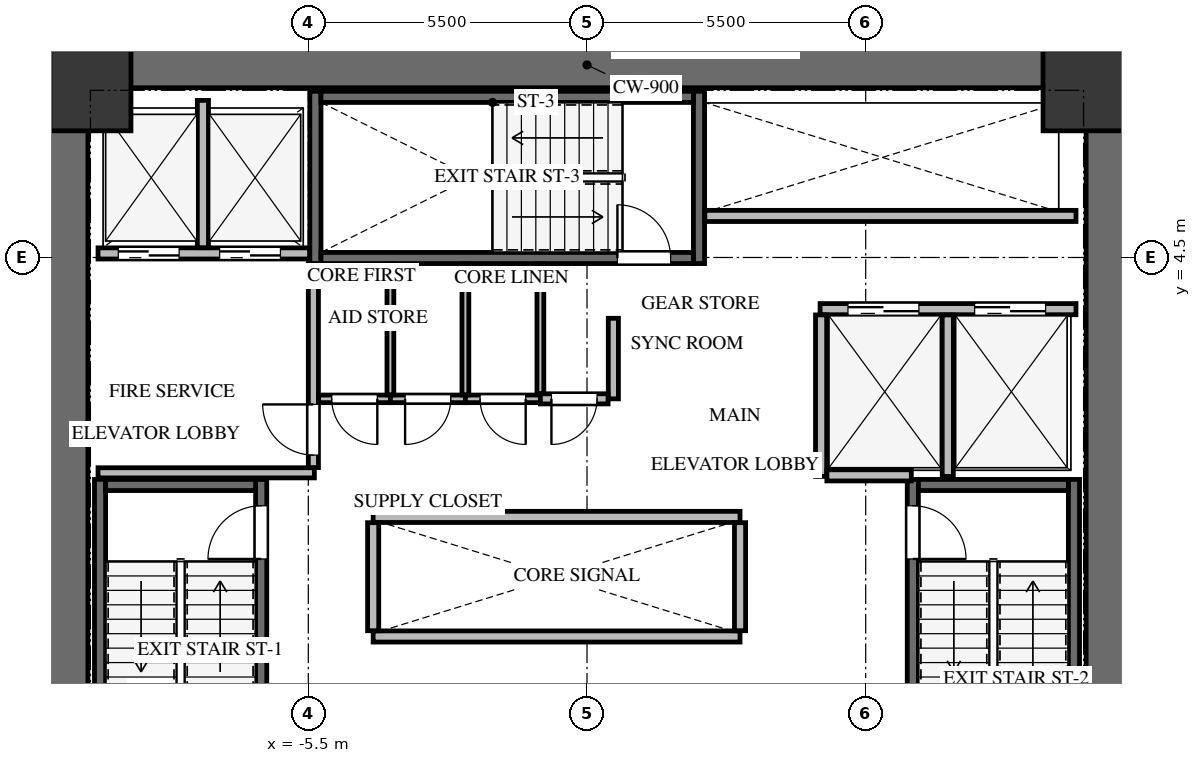
"""IFC4 building model, lengths in metres.
Left out: names, types, materials, properties, quantities, classifications, styles, units other than length and angle.
Written with IfcOpenShell. Run it as: python <this file> out.ifc"""

import sys

from ifc_helpers import new_model, si_unit, direction, frame, frame_2d, origin, origin_2d, place, context, subcontext, project, spatial, rectangle, extrude, source, transform, mapped, element, fill, save


model = new_model("IFC4")
c1 = context("Model", 3, precision=1e-05, world=origin(), true_north=direction((0.0, 1.0)))
c2 = subcontext(c1, "Body", "Model", "MODEL_VIEW")
j1 = project(units=[si_unit("LENGTHUNIT", "METRE"), si_unit("PLANEANGLEUNIT", "RADIAN")], contexts=[c1])
p1 = place(None, origin())
s1 = spatial("IfcSite", under=j1, at=p1, CompositionType="ELEMENT")
p2 = place(p1, origin())
s2 = spatial("IfcBuilding", under=s1, at=p2, CompositionType="ELEMENT")
p3 = place(p2, frame((0.0, 0.0, 55.5)))
s3 = spatial("IfcBuildingStorey", under=s2, at=p3, CompositionType="ELEMENT", Elevation=55.5)
for number, where, z_axis, x_axis in (
    (1, (-10.3, -8.75, 0.0), (0.0, 0.0, 1.0), (0.0, 1.0, 0.0)),
    (2, (10.3, -8.75, 0.0), (0.0, 0.0, 1.0), (0.0, 1.0, 0.0)),
):
    element("IfcWall", number, at=place(p3, frame(where, z_axis=z_axis, x_axis=x_axis)), inside=s3, PredefinedType="SHEAR", context=c2, shape_type="SweptSolid", body=[
        extrude(rectangle(XDim=17.5, YDim=0.9, at=frame_2d((8.75, 0.0))), origin(), (0.0, 0.0, 1.0), 3.3),
    ])
p4 = place(p3, frame((-9.85, 8.3, 0.0), z_axis=(0.0, 0.0, 1.0), x_axis=(1.0, 0.0, 0.0)))
e3 = element("IfcWall", 3, at=p4, inside=s3, PredefinedType="SHEAR", context=c2, shape_type="SweptSolid", body=[
    extrude(rectangle(XDim=19.7, YDim=0.9, at=frame_2d((9.85, 0.0))), origin(), (0.0, 0.0, 1.0), 3.3),
])
p5 = place(p3, frame((-6.43, -7.77, -0.24), z_axis=(0.0, 0.0, 1.0), x_axis=(0.0, 1.0, 0.0)))
e4 = element("IfcWall", 4, at=p5, inside=s3, PredefinedType="SHEAR", context=c2, shape_type="SweptSolid", body=[
    extrude(rectangle(XDim=7.89, YDim=0.22, at=frame_2d((3.945, 0.0))), origin(), (0.0, 0.0, 1.0), 3.3),
])
p6 = place(p5, frame((6.32, 0.0, 0.0)))
e5 = element("IfcOpeningElement", 5, at=p6, cuts=e4, PredefinedType="OPENING", context=c2, shape_type="SweptSolid", body=[
    extrude(rectangle(XDim=1.05, YDim=2.15, at=frame_2d((0.525, 1.075))), frame((0.0, 0.12, 0.0), z_axis=(0.0, -1.0, 0.0), x_axis=(1.0, 0.0, 0.0)), (0.0, 0.0, 1.0), 0.24),
])
p7 = place(p3, frame((-9.61, 0.12, -0.24), z_axis=(0.0, 0.0, 1.0), x_axis=(0.0, -1.0, 0.0)))
e6 = element("IfcWall", 6, at=p7, inside=s3, PredefinedType="SHEAR", context=c2, shape_type="SweptSolid", body=[
    extrude(rectangle(XDim=7.89, YDim=0.22, at=frame_2d((3.945, 0.0))), origin(), (0.0, 0.0, 1.0), 3.3),
])
p8 = place(p3, frame((-6.54, 0.01, -0.24), z_axis=(0.0, 0.0, 1.0), x_axis=(-1.0, 0.0, 0.0)))
e7 = element("IfcWall", 7, at=p8, inside=s3, PredefinedType="SHEAR", context=c2, shape_type="SweptSolid", body=[
    extrude(rectangle(XDim=2.96, YDim=0.22, at=frame_2d((1.48, 0.0))), origin(), (0.0, 0.0, 1.0), 3.3),
])
p9 = place(p3, frame((9.61, -7.77, -0.24), z_axis=(0.0, 0.0, 1.0), x_axis=(0.0, 1.0, 0.0)))
e8 = element("IfcWall", 8, at=p9, inside=s3, PredefinedType="SHEAR", context=c2, shape_type="SweptSolid", body=[
    extrude(rectangle(XDim=7.89, YDim=0.22, at=frame_2d((3.945, 0.0))), origin(), (0.0, 0.0, 1.0), 3.3),
])
p10 = place(p3, frame((6.43, 0.12, -0.24), z_axis=(0.0, 0.0, 1.0), x_axis=(0.0, -1.0, 0.0)))
e9 = element("IfcWall", 9, at=p10, inside=s3, PredefinedType="SHEAR", context=c2, shape_type="SweptSolid", body=[
    extrude(rectangle(XDim=7.89, YDim=0.22, at=frame_2d((3.945, 0.0))), origin(), (0.0, 0.0, 1.0), 3.3),
])
p11 = place(p10, frame((0.52, 0.0, 0.0)))
e10 = element("IfcOpeningElement", 10, at=p11, cuts=e9, PredefinedType="OPENING", context=c2, shape_type="SweptSolid", body=[
    extrude(rectangle(XDim=1.05, YDim=2.15, at=frame_2d((0.525, 1.075))), frame((0.0, 0.12, 0.0), z_axis=(0.0, -1.0, 0.0), x_axis=(1.0, 0.0, 0.0)), (0.0, 0.0, 1.0), 0.24),
])
p12 = place(p3, frame((9.5, 0.01, -0.24), z_axis=(0.0, 0.0, 1.0), x_axis=(-1.0, 0.0, 0.0)))
e11 = element("IfcWall", 11, at=p12, inside=s3, PredefinedType="SHEAR", context=c2, shape_type="SweptSolid", body=[
    extrude(rectangle(XDim=2.96, YDim=0.22, at=frame_2d((1.48, 0.0))), origin(), (0.0, 0.0, 1.0), 3.3),
])
for number, where, z_axis, x_axis in (
    (12, (2.21, 4.38, -0.24), (0.0, 0.0, 1.0), (0.0, 1.0, 0.0)),
    (13, (-5.36, 7.78, -0.24), (0.0, 0.0, 1.0), (0.0, -1.0, 0.0)),
):
    element("IfcWall", number, at=place(p3, frame(where, z_axis=z_axis, x_axis=x_axis)), inside=s3, PredefinedType="SHEAR", context=c2, shape_type="SweptSolid", body=[
        extrude(rectangle(XDim=3.4, YDim=0.22, at=frame_2d((1.7, 0.0))), origin(), (0.0, 0.0, 1.0), 3.3),
    ])
p13 = place(p3, frame((-5.25, 4.49, -0.24), z_axis=(0.0, 0.0, 1.0), x_axis=(1.0, 0.0, 0.0)))
e14 = element("IfcWall", 14, at=p13, inside=s3, PredefinedType="SHEAR", context=c2, shape_type="SweptSolid", body=[
    extrude(rectangle(XDim=7.35, YDim=0.22, at=frame_2d((3.675, 0.0))), origin(), (0.0, 0.0, 1.0), 3.3),
])
p14 = place(p13, frame((5.85, 0.0, 0.0)))
e15 = element("IfcOpeningElement", 15, at=p14, cuts=e14, PredefinedType="OPENING", context=c2, shape_type="SweptSolid", body=[
    extrude(rectangle(XDim=1.05, YDim=2.15, at=frame_2d((0.525, 1.075))), frame((0.0, 0.12, 0.0), z_axis=(0.0, -1.0, 0.0), x_axis=(1.0, 0.0, 0.0)), (0.0, 0.0, 1.0), 0.24),
])
p15 = place(p3, frame((2.1, 7.67, -0.24), z_axis=(0.0, 0.0, 1.0), x_axis=(-1.0, 0.0, 0.0)))
e16 = element("IfcWall", 16, at=p15, inside=s3, PredefinedType="SHEAR", context=c2, shape_type="SweptSolid", body=[
    extrude(rectangle(XDim=7.35, YDim=0.22, at=frame_2d((3.675, 0.0))), origin(), (0.0, 0.0, 1.0), 3.3),
])
m1 = source(origin(), c2, "Body", "SweptSolid", [
    extrude(rectangle(XDim=1.6, YDim=1.6, at=origin_2d()), origin(), (0.0, 0.0, 1.0), 3.3),
])
for number, where, z_axis, x_axis in (
    (17, (9.8, 7.8, -0.24), (0.0, 0.0, 1.0), (1.0, 0.0, 0.0)),
    (18, (-9.8, 7.8, -0.24), (0.0, 0.0, 1.0), (1.0, 0.0, 0.0)),
):
    element("IfcColumn", number, at=place(p3, frame(where, z_axis=z_axis, x_axis=x_axis)), inside=s3, PredefinedType="COLUMN", context=c2, shape_type="MappedRepresentation", body=[
        mapped(m1, transform((0.0, 0.0, 0.0), x_axis=(1.0, 0.0, 0.0), y_axis=(0.0, 1.0, 0.0), z_axis=(0.0, 0.0, 1.0), scale=1.0)),
    ])
p16 = place(p3, frame((-9.65, 4.58, 0.0), z_axis=(0.0, 0.0, 1.0), x_axis=(1.0, 0.0, 0.0)))
e19 = element("IfcWall", 19, at=p16, inside=s3, PredefinedType="SOLIDWALL", context=c2, shape_type="SweptSolid", body=[
    extrude(rectangle(XDim=4.175, YDim=0.22, at=frame_2d((2.087, 0.0))), origin(), (0.0, 0.0, 1.0), 3.045),
])
p17 = place(p16, frame((0.4, 0.0, 0.0)))
e20 = element("IfcOpeningElement", 20, at=p17, cuts=e19, PredefinedType="OPENING", context=c2, shape_type="SweptSolid", body=[
    extrude(rectangle(XDim=1.2, YDim=2.15, at=frame_2d((0.6, 1.075))), frame((0.0, 0.12, 0.0), z_axis=(0.0, -1.0, 0.0), x_axis=(1.0, 0.0, 0.0)), (0.0, 0.0, 1.0), 0.24),
])
p18 = place(p16, frame((2.4, 0.0, 0.0)))
e21 = element("IfcOpeningElement", 21, at=p18, cuts=e19, PredefinedType="OPENING", context=c2, shape_type="SweptSolid", body=[
    extrude(rectangle(XDim=1.2, YDim=2.15, at=frame_2d((0.6, 1.075))), frame((0.0, 0.12, 0.0), z_axis=(0.0, -1.0, 0.0), x_axis=(1.0, 0.0, 0.0)), (0.0, 0.0, 1.0), 0.24),
])
p19 = place(p3, frame((-7.58, 4.694, 0.0), z_axis=(0.0, 0.0, 1.0), x_axis=(0.0, 1.0, 0.0)))
e22 = element("IfcWall", 22, at=p19, inside=s3, PredefinedType="SOLIDWALL", context=c2, shape_type="SweptSolid", body=[
    extrude(rectangle(XDim=2.906, YDim=0.22, at=frame_2d((1.453, 0.0))), origin(), (0.0, 0.0, 1.0), 3.045),
])
p20 = place(p3, frame((-9.65, 0.25, 0.0), z_axis=(0.0, 0.0, 1.0), x_axis=(1.0, 0.0, 0.0)))
e23 = element("IfcWall", 23, at=p20, inside=s3, PredefinedType="SOLIDWALL", context=c2, shape_type="SweptSolid", body=[
    extrude(rectangle(XDim=4.27, YDim=0.2, at=frame_2d((2.135, 0.0))), origin(), (0.0, 0.0, 1.0), 3.045),
])
p21 = place(p3, frame((-5.4, 0.354, 0.0), z_axis=(0.0, 0.0, 1.0), x_axis=(0.0, 1.0, 0.0)))
e24 = element("IfcWall", 24, at=p21, inside=s3, PredefinedType="SOLIDWALL", context=c2, shape_type="SweptSolid", body=[
    extrude(rectangle(XDim=4.026, YDim=0.2, at=frame_2d((2.013, 0.0))), origin(), (0.0, 0.0, 1.0), 3.045),
])
p22 = place(p21, frame((0.246, 0.0, 0.0)))
e25 = element("IfcOpeningElement", 25, at=p22, cuts=e24, PredefinedType="OPENING", context=c2, shape_type="SweptSolid", body=[
    extrude(rectangle(XDim=1.0, YDim=2.15, at=frame_2d((0.5, 1.075))), frame((0.0, 0.11, 0.0), z_axis=(0.0, -1.0, 0.0), x_axis=(1.0, 0.0, 0.0)), (0.0, 0.0, 1.0), 0.22),
])
p23 = place(p3, frame((4.6, 3.48, 0.0), z_axis=(0.0, 0.0, 1.0), x_axis=(1.0, 0.0, 0.0)))
e26 = element("IfcWall", 26, at=p23, inside=s3, PredefinedType="SOLIDWALL", context=c2, shape_type="SweptSolid", body=[
    extrude(rectangle(XDim=5.05, YDim=0.22, at=frame_2d((2.525, 0.0))), origin(), (0.0, 0.0, 1.0), 3.045),
])
p24 = place(p23, frame((0.55, 0.0, 0.0)))
e27 = element("IfcOpeningElement", 27, at=p24, cuts=e26, PredefinedType="OPENING", context=c2, shape_type="SweptSolid", body=[
    extrude(rectangle(XDim=1.4, YDim=2.15, at=frame_2d((0.7, 1.075))), frame((0.0, 0.12, 0.0), z_axis=(0.0, -1.0, 0.0), x_axis=(1.0, 0.0, 0.0)), (0.0, 0.0, 1.0), 0.24),
])
p25 = place(p23, frame((3.05, 0.0, 0.0)))
e28 = element("IfcOpeningElement", 28, at=p25, cuts=e26, PredefinedType="OPENING", context=c2, shape_type="SweptSolid", body=[
    extrude(rectangle(XDim=1.4, YDim=2.15, at=frame_2d((0.7, 1.075))), frame((0.0, 0.12, 0.0), z_axis=(0.0, -1.0, 0.0), x_axis=(1.0, 0.0, 0.0)), (0.0, 0.0, 1.0), 0.24),
])
for number, where, z_axis, x_axis in (
    (29, (4.62, 0.18, 0.0), (0.0, 0.0, 1.0), (0.0, 1.0, 0.0)),
    (30, (7.12, 0.18, 0.0), (0.0, 0.0, 1.0), (0.0, 1.0, 0.0)),
):
    element("IfcWall", number, at=place(p3, frame(where, z_axis=z_axis, x_axis=x_axis)), inside=s3, PredefinedType="SOLIDWALL", context=c2, shape_type="SweptSolid", body=[
        extrude(rectangle(XDim=3.186, YDim=0.22, at=frame_2d((1.593, 0.0))), origin(), (0.0, 0.0, 1.0), 3.045),
    ])
p26 = place(p3, frame((4.734, 0.2, 0.0), z_axis=(0.0, 0.0, 1.0), x_axis=(1.0, 0.0, 0.0)))
e31 = element("IfcWall", 31, at=p26, inside=s3, PredefinedType="SOLIDWALL", context=c2, shape_type="SweptSolid", body=[
    extrude(rectangle(XDim=1.666, YDim=0.22, at=frame_2d((0.833, 0.0))), origin(), (0.0, 0.0, 1.0), 3.045),
])
for number, where, z_axis, x_axis in (
    (32, (-4.22, -2.98, 0.0), (0.0, 0.0, 1.0), (1.0, 0.0, 0.0)),
    (33, (-4.22, -0.62, 0.0), (0.0, 0.0, 1.0), (1.0, 0.0, 0.0)),
):
    element("IfcWall", number, at=place(p3, frame(where, z_axis=z_axis, x_axis=x_axis)), inside=s3, PredefinedType="SOLIDWALL", context=c2, shape_type="SweptSolid", body=[
        extrude(rectangle(XDim=7.24, YDim=0.22, at=frame_2d((3.62, 0.0))), origin(), (0.0, 0.0, 1.0), 3.045),
    ])
for number, where, z_axis, x_axis in (
    (34, (-4.22, -2.866, 0.0), (0.0, 0.0, 1.0), (0.0, 1.0, 0.0)),
    (35, (3.02, -2.866, 0.0), (0.0, 0.0, 1.0), (0.0, 1.0, 0.0)),
):
    element("IfcWall", number, at=place(p3, frame(where, z_axis=z_axis, x_axis=x_axis)), inside=s3, PredefinedType="SOLIDWALL", context=c2, shape_type="SweptSolid", body=[
        extrude(rectangle(XDim=2.132, YDim=0.22, at=frame_2d((1.066, 0.0))), origin(), (0.0, 0.0, 1.0), 3.045),
    ])
p27 = place(p3, frame((2.325, 5.32, 0.0), z_axis=(0.0, 0.0, 1.0), x_axis=(1.0, 0.0, 0.0)))
e36 = element("IfcWall", 36, at=p27, inside=s3, PredefinedType="SOLIDWALL", context=c2, shape_type="SweptSolid", body=[
    extrude(rectangle(XDim=7.325, YDim=0.22, at=frame_2d((3.663, 0.0))), origin(), (0.0, 0.0, 1.0), 3.045),
])
p28 = place(p3, frame((-3.88, 1.71, 0.0), z_axis=(0.0, 0.0, 1.0), x_axis=(-1.0, 0.0, 0.0)))
e37 = element("IfcWall", 37, at=p28, inside=s3, PredefinedType="PARTITIONING", context=c2, shape_type="SweptSolid", body=[
    extrude(rectangle(XDim=1.416, YDim=0.15, at=frame_2d((0.708, 0.0))), origin(), (0.0, 0.0, 1.0), 3.045),
])
p29 = place(p28, frame((0.258, 0.0, 0.0)))
e38 = element("IfcOpeningElement", 38, at=p29, cuts=e37, PredefinedType="OPENING", context=c2, shape_type="SweptSolid", body=[
    extrude(rectangle(XDim=0.9, YDim=2.05, at=frame_2d((0.45, 1.025))), frame((0.0, 0.085, 0.0), z_axis=(0.0, -1.0, 0.0), x_axis=(1.0, 0.0, 0.0)), (0.0, 0.0, 1.0), 0.17),
])
p30 = place(p3, frame((-2.4, 1.71, 0.0), z_axis=(0.0, 0.0, 1.0), x_axis=(-1.0, 0.0, 0.0)))
e39 = element("IfcWall", 39, at=p30, inside=s3, PredefinedType="PARTITIONING", context=c2, shape_type="SweptSolid", body=[
    extrude(rectangle(XDim=1.48, YDim=0.15, at=frame_2d((0.74, 0.0))), origin(), (0.0, 0.0, 1.0), 3.045),
])
p31 = place(p30, frame((0.29, 0.0, 0.0)))
e40 = element("IfcOpeningElement", 40, at=p31, cuts=e39, PredefinedType="OPENING", context=c2, shape_type="SweptSolid", body=[
    extrude(rectangle(XDim=0.9, YDim=2.05, at=frame_2d((0.45, 1.025))), frame((0.0, 0.085, 0.0), z_axis=(0.0, -1.0, 0.0), x_axis=(1.0, 0.0, 0.0)), (0.0, 0.0, 1.0), 0.17),
])
p32 = place(p3, frame((-0.92, 1.71, 0.0), z_axis=(0.0, 0.0, 1.0), x_axis=(-1.0, 0.0, 0.0)))
e41 = element("IfcWall", 41, at=p32, inside=s3, PredefinedType="PARTITIONING", context=c2, shape_type="SweptSolid", body=[
    extrude(rectangle(XDim=1.48, YDim=0.15, at=frame_2d((0.74, 0.0))), origin(), (0.0, 0.0, 1.0), 3.045),
])
p33 = place(p32, frame((0.29, 0.0, 0.0)))
e42 = element("IfcOpeningElement", 42, at=p33, cuts=e41, PredefinedType="OPENING", context=c2, shape_type="SweptSolid", body=[
    extrude(rectangle(XDim=0.9, YDim=2.05, at=frame_2d((0.45, 1.025))), frame((0.0, 0.085, 0.0), z_axis=(0.0, -1.0, 0.0), x_axis=(1.0, 0.0, 0.0)), (0.0, 0.0, 1.0), 0.17),
])
p34 = place(p3, frame((0.52, 3.3, 0.0), z_axis=(0.0, 0.0, 1.0), x_axis=(0.0, -1.0, 0.0)))
e43 = element("IfcWall", 43, at=p34, inside=s3, PredefinedType="SOLIDWALL", context=c2, shape_type="SweptSolid", body=[
    extrude(rectangle(XDim=1.59, YDim=0.2, at=frame_2d((0.795, 0.0))), origin(), (0.0, 0.0, 1.0), 3.045),
])
p35 = place(p3, frame((0.416, 1.71, 0.0), z_axis=(0.0, 0.0, 1.0), x_axis=(-1.0, 0.0, 0.0)))
e44 = element("IfcWall", 44, at=p35, inside=s3, PredefinedType="SOLIDWALL", context=c2, shape_type="SweptSolid", body=[
    extrude(rectangle(XDim=1.336, YDim=0.2, at=frame_2d((0.668, 0.0))), origin(), (0.0, 0.0, 1.0), 3.045),
])
p36 = place(p35, frame((0.218, 0.0, 0.0)))
e45 = element("IfcOpeningElement", 45, at=p36, cuts=e44, PredefinedType="OPENING", context=c2, shape_type="SweptSolid", body=[
    extrude(rectangle(XDim=0.9, YDim=2.05, at=frame_2d((0.45, 1.025))), frame((0.0, 0.11, 0.0), z_axis=(0.0, -1.0, 0.0), x_axis=(1.0, 0.0, 0.0)), (0.0, 0.0, 1.0), 0.22),
])
for number, where, z_axis, x_axis in (
    (46, (-3.88, 4.375, 0.0), (0.0, 0.0, 1.0), (0.0, -1.0, 0.0)),
    (47, (-2.4, 4.375, 0.0), (0.0, 0.0, 1.0), (0.0, -1.0, 0.0)),
):
    element("IfcWall", number, at=place(p3, frame(where, z_axis=z_axis, x_axis=x_axis)), inside=s3, PredefinedType="PARTITIONING", context=c2, shape_type="SweptSolid", body=[
        extrude(rectangle(XDim=2.586, YDim=0.135, at=frame_2d((1.293, 0.0))), origin(), (0.0, 0.0, 1.0), 3.045),
    ])
p37 = place(p3, frame((-0.92, 4.375, 0.0), z_axis=(0.0, 0.0, 1.0), x_axis=(0.0, -1.0, 0.0)))
e48 = element("IfcWall", 48, at=p37, inside=s3, PredefinedType="PARTITIONING", context=c2, shape_type="SweptSolid", body=[
    extrude(rectangle(XDim=2.561, YDim=0.135, at=frame_2d((1.281, 0.0))), origin(), (0.0, 0.0, 1.0), 3.045),
])
m2 = source(origin(), c2, "Body", "SweptSolid", [
    extrude(rectangle(XDim=1.05, YDim=2.15, at=frame_2d((0.525, 1.075))), frame((0.0, 0.025, 0.0), z_axis=(0.0, -1.0, 0.0), x_axis=(1.0, 0.0, 0.0)), (0.0, 0.0, 1.0), 0.05),
])
p38 = place(p6, origin())
e49 = element("IfcDoor", 49, at=p38, inside=s3, OperationType="SINGLE_SWING_LEFT", PredefinedType="DOOR", context=c2, shape_type="MappedRepresentation", body=[
    mapped(m2, transform((0.0, 0.0, 0.0), x_axis=(1.0, 0.0, 0.0), y_axis=(0.0, 1.0, 0.0), z_axis=(0.0, 0.0, 1.0), scale=1.0)),
])
fill(e5, e49)
m3 = source(origin(), c2, "Body", "SweptSolid", [
    extrude(rectangle(XDim=1.05, YDim=2.15, at=frame_2d((0.525, 1.075))), frame((0.0, 0.025, 0.0), z_axis=(0.0, -1.0, 0.0), x_axis=(1.0, 0.0, 0.0)), (0.0, 0.0, 1.0), 0.05),
])
p39 = place(p11, origin())
e50 = element("IfcDoor", 50, at=p39, inside=s3, OperationType="SINGLE_SWING_RIGHT", PredefinedType="DOOR", context=c2, shape_type="MappedRepresentation", body=[
    mapped(m3, transform((0.0, 0.0, 0.0), x_axis=(1.0, 0.0, 0.0), y_axis=(0.0, 1.0, 0.0), z_axis=(0.0, 0.0, 1.0), scale=1.0)),
])
fill(e10, e50)
p40 = place(p14, origin())
e51 = element("IfcDoor", 51, at=p40, inside=s3, OperationType="SINGLE_SWING_LEFT", PredefinedType="DOOR", context=c2, shape_type="MappedRepresentation", body=[
    mapped(m2, transform((0.0, 0.0, 0.0), x_axis=(1.0, 0.0, 0.0), y_axis=(0.0, 1.0, 0.0), z_axis=(0.0, 0.0, 1.0), scale=1.0)),
])
fill(e15, e51)
m4 = source(origin(), c2, "Body", "SweptSolid", [
    extrude(rectangle(XDim=1.2, YDim=2.15, at=frame_2d((0.6, 1.075))), frame((0.0, 0.025, 0.0), z_axis=(0.0, -1.0, 0.0), x_axis=(1.0, 0.0, 0.0)), (0.0, 0.0, 1.0), 0.05),
])
p41 = place(p17, origin())
e52 = element("IfcDoor", 52, at=p41, inside=s3, OperationType="DOUBLE_DOOR_SLIDING", PredefinedType="DOOR", context=c2, shape_type="MappedRepresentation", body=[
    mapped(m4, transform((0.0, 0.0, 0.0), x_axis=(1.0, 0.0, 0.0), y_axis=(0.0, 1.0, 0.0), z_axis=(0.0, 0.0, 1.0), scale=1.0)),
])
fill(e20, e52)
p42 = place(p18, origin())
e53 = element("IfcDoor", 53, at=p42, inside=s3, OperationType="DOUBLE_DOOR_SLIDING", PredefinedType="DOOR", context=c2, shape_type="MappedRepresentation", body=[
    mapped(m4, transform((0.0, 0.0, 0.0), x_axis=(1.0, 0.0, 0.0), y_axis=(0.0, 1.0, 0.0), z_axis=(0.0, 0.0, 1.0), scale=1.0)),
])
fill(e21, e53)
m5 = source(origin(), c2, "Body", "SweptSolid", [
    extrude(rectangle(XDim=1.0, YDim=2.15, at=frame_2d((0.5, 1.075))), frame((0.0, 0.025, 0.0), z_axis=(0.0, -1.0, 0.0), x_axis=(1.0, 0.0, 0.0)), (0.0, 0.0, 1.0), 0.05),
])
p43 = place(p22, origin())
e54 = element("IfcDoor", 54, at=p43, inside=s3, OperationType="SINGLE_SWING_RIGHT", PredefinedType="DOOR", context=c2, shape_type="MappedRepresentation", body=[
    mapped(m5, transform((0.0, 0.0, 0.0), x_axis=(1.0, 0.0, 0.0), y_axis=(0.0, 1.0, 0.0), z_axis=(0.0, 0.0, 1.0), scale=1.0)),
])
fill(e25, e54)
m6 = source(origin(), c2, "Body", "SweptSolid", [
    extrude(rectangle(XDim=1.4, YDim=2.15, at=frame_2d((0.7, 1.075))), frame((0.0, 0.025, 0.0), z_axis=(0.0, -1.0, 0.0), x_axis=(1.0, 0.0, 0.0)), (0.0, 0.0, 1.0), 0.05),
])
p44 = place(p24, origin())
e55 = element("IfcDoor", 55, at=p44, inside=s3, OperationType="DOUBLE_DOOR_SLIDING", PredefinedType="DOOR", context=c2, shape_type="MappedRepresentation", body=[
    mapped(m6, transform((0.0, 0.0, 0.0), x_axis=(1.0, 0.0, 0.0), y_axis=(0.0, 1.0, 0.0), z_axis=(0.0, 0.0, 1.0), scale=1.0)),
])
fill(e27, e55)
p45 = place(p25, origin())
e56 = element("IfcDoor", 56, at=p45, inside=s3, OperationType="DOUBLE_DOOR_SLIDING", PredefinedType="DOOR", context=c2, shape_type="MappedRepresentation", body=[
    mapped(m6, transform((0.0, 0.0, 0.0), x_axis=(1.0, 0.0, 0.0), y_axis=(0.0, 1.0, 0.0), z_axis=(0.0, 0.0, 1.0), scale=1.0)),
])
fill(e28, e56)
m7 = source(origin(), c2, "Body", "SweptSolid", [
    extrude(rectangle(XDim=0.9, YDim=2.05, at=frame_2d((0.45, 1.025))), frame((0.0, 0.025, 0.0), z_axis=(0.0, -1.0, 0.0), x_axis=(1.0, 0.0, 0.0)), (0.0, 0.0, 1.0), 0.05),
])
p46 = place(p29, origin())
e57 = element("IfcDoor", 57, at=p46, inside=s3, OperationType="SINGLE_SWING_LEFT", PredefinedType="DOOR", context=c2, shape_type="MappedRepresentation", body=[
    mapped(m7, transform((0.0, 0.0, 0.0), x_axis=(1.0, 0.0, 0.0), y_axis=(0.0, 1.0, 0.0), z_axis=(0.0, 0.0, 1.0), scale=1.0)),
])
fill(e38, e57)
m8 = source(origin(), c2, "Body", "SweptSolid", [
    extrude(rectangle(XDim=0.9, YDim=2.05, at=frame_2d((0.45, 1.025))), frame((0.0, 0.025, 0.0), z_axis=(0.0, -1.0, 0.0), x_axis=(1.0, 0.0, 0.0)), (0.0, 0.0, 1.0), 0.05),
])
p47 = place(p31, origin())
e58 = element("IfcDoor", 58, at=p47, inside=s3, OperationType="SINGLE_SWING_RIGHT", PredefinedType="DOOR", context=c2, shape_type="MappedRepresentation", body=[
    mapped(m8, transform((0.0, 0.0, 0.0), x_axis=(1.0, 0.0, 0.0), y_axis=(0.0, 1.0, 0.0), z_axis=(0.0, 0.0, 1.0), scale=1.0)),
])
fill(e40, e58)
p48 = place(p33, origin())
e59 = element("IfcDoor", 59, at=p48, inside=s3, OperationType="SINGLE_SWING_LEFT", PredefinedType="DOOR", context=c2, shape_type="MappedRepresentation", body=[
    mapped(m7, transform((0.0, 0.0, 0.0), x_axis=(1.0, 0.0, 0.0), y_axis=(0.0, 1.0, 0.0), z_axis=(0.0, 0.0, 1.0), scale=1.0)),
])
fill(e42, e59)
p49 = place(p36, origin())
e60 = element("IfcDoor", 60, at=p49, inside=s3, OperationType="SINGLE_SWING_RIGHT", PredefinedType="DOOR", context=c2, shape_type="MappedRepresentation", body=[
    mapped(m8, transform((0.0, 0.0, 0.0), x_axis=(1.0, 0.0, 0.0), y_axis=(0.0, 1.0, 0.0), z_axis=(0.0, 0.0, 1.0), scale=1.0)),
])
fill(e45, e60)
save(model, sys.argv[1])
